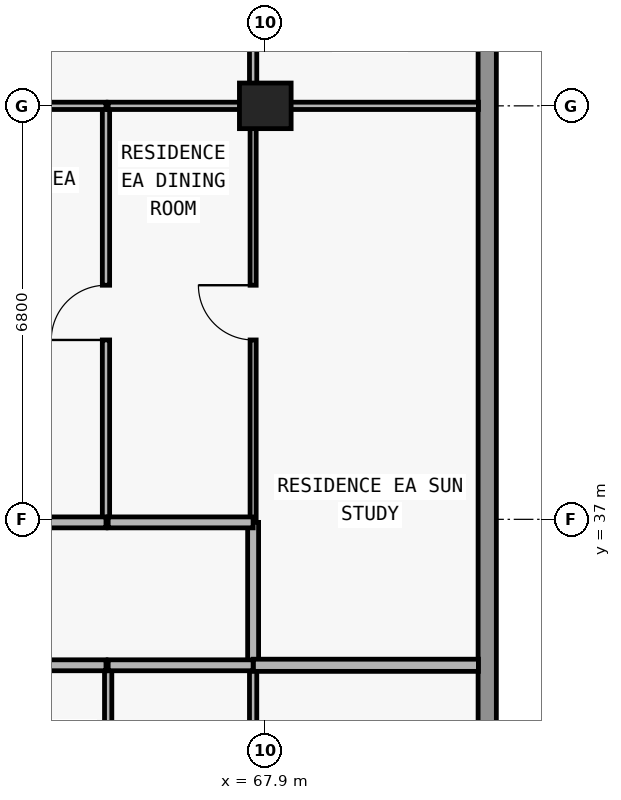
"""IFC4 building model, lengths in metres.
Left out: names, types, materials, properties, quantities, classifications, styles, units other than length and angle.
Written with IfcOpenShell. Run it as: python <this file> out.ifc"""

import sys

from ifc_helpers import new_model, si_unit, direction, frame, frame_2d, origin, origin_2d, place, context, subcontext, project, spatial, rectangle, extrude, element, fill, save


model = new_model("IFC4")
c1 = context("Model", 3, precision=1e-05, world=origin(), true_north=direction((0.0, 1.0)))
c2 = subcontext(c1, "Body", "Model", "MODEL_VIEW")
j1 = project(units=[si_unit("LENGTHUNIT", "METRE"), si_unit("PLANEANGLEUNIT", "RADIAN")], contexts=[c1])
p1 = place(None, origin())
s1 = spatial("IfcSite", under=j1, at=p1, CompositionType="ELEMENT")
p2 = place(p1, origin())
s2 = spatial("IfcBuilding", under=s1, at=p2, CompositionType="ELEMENT")
p3 = place(p2, frame((0.0, 0.0, 173.7)))
s3 = spatial("IfcBuildingStorey", under=s2, at=p3, CompositionType="ELEMENT", Elevation=173.7)
p4 = place(p3, frame((67.9, 43.8, 0.0), z_axis=(0.0, 0.0, 1.0), x_axis=(1.0, 0.0, 0.0)))
e1 = element("IfcColumn", 1, at=p4, inside=s3, PredefinedType="COLUMN", context=c2, shape_type="SweptSolid", body=[
    extrude(rectangle(XDim=0.85, YDim=0.75, at=origin_2d()), origin(), (0.0, 0.0, 1.0), 3.05),
])
p5 = place(p3, frame((71.55, 47.0, 0.0), z_axis=(0.0, 0.0, 1.0), x_axis=(0.0, -1.0, 0.0)))
e2 = element("IfcWall", 2, at=p5, inside=s3, PredefinedType="STANDARD", context=c2, shape_type="SweptSolid", body=[
    extrude(rectangle(XDim=17.9, YDim=0.3, at=frame_2d((8.95, 0.0))), origin(), (0.0, 0.0, 1.0), 3.05),
])
p6 = place(p3, frame((65.28, 37.0, 0.0), z_axis=(0.0, 0.0, 1.0), x_axis=(0.0, 1.0, 0.0)))
e3 = element("IfcWall", 3, at=p6, inside=s3, PredefinedType="PARTITIONING", context=c2, shape_type="SweptSolid", body=[
    extrude(rectangle(XDim=6.8, YDim=0.12, at=frame_2d((3.4, 0.0))), origin(), (0.0, 0.0, 1.0), 2.679),
])
p7 = place(p6, frame((2.95, 0.0, 0.0)))
e4 = element("IfcOpeningElement", 4, at=p7, cuts=e3, PredefinedType="OPENING", context=c2, shape_type="SweptSolid", body=[
    extrude(rectangle(XDim=0.9, YDim=2.15, at=frame_2d((0.45, 1.075))), frame((0.0, 0.07, 0.0), z_axis=(0.0, -1.0, 0.0), x_axis=(1.0, 0.0, 0.0)), (0.0, 0.0, 1.0), 0.14),
])
p8 = place(p3, frame((65.316, 30.34, 0.0), z_axis=(0.0, 0.0, 1.0), x_axis=(0.0, 1.0, 0.0)))
e5 = element("IfcWall", 5, at=p8, inside=s3, PredefinedType="PARTITIONING", context=c2, shape_type="SweptSolid", body=[
    extrude(rectangle(XDim=4.26, YDim=0.12, at=frame_2d((2.13, 0.0))), origin(), (0.0, 0.0, 1.0), 2.679),
])
p9 = place(p8, frame((1.705, 0.0, 0.0)))
e6 = element("IfcOpeningElement", 6, at=p9, cuts=e5, PredefinedType="OPENING", context=c2, shape_type="SweptSolid", body=[
    extrude(rectangle(XDim=0.85, YDim=2.1, at=frame_2d((0.425, 1.05))), frame((0.0, 0.07, 0.0), z_axis=(0.0, -1.0, 0.0), x_axis=(1.0, 0.0, 0.0)), (0.0, 0.0, 1.0), 0.14),
])
p10 = place(p3, frame((67.7, 30.34, 0.0), z_axis=(0.0, 0.0, 1.0), x_axis=(0.0, 1.0, 0.0)))
e7 = element("IfcWall", 7, at=p10, inside=s3, PredefinedType="PARTITIONING", context=c2, shape_type="SweptSolid", body=[
    extrude(rectangle(XDim=4.26, YDim=0.12, at=frame_2d((2.13, 0.0))), origin(), (0.0, 0.0, 1.0), 2.263),
])
p11 = place(p3, frame((67.7, 34.605, 0.0), z_axis=(0.0, 0.0, 1.0), x_axis=(0.0, 1.0, 0.0)))
e8 = element("IfcWall", 8, at=p11, inside=s3, PredefinedType="PARTITIONING", context=c2, shape_type="SweptSolid", body=[
    extrude(rectangle(XDim=2.345, YDim=0.18, at=frame_2d((1.172, 0.0))), origin(), (0.0, 0.0, 1.0), 2.263),
])
p12 = place(p3, frame((67.7, 37.0, 0.0), z_axis=(0.0, 0.0, 1.0), x_axis=(0.0, 1.0, 0.0)))
e9 = element("IfcWall", 9, at=p12, inside=s3, PredefinedType="MOVABLE", context=c2, shape_type="SweptSolid", body=[
    extrude(rectangle(XDim=6.8, YDim=0.1, at=frame_2d((3.4, 0.0))), origin(), (0.0, 0.0, 1.0), 2.263),
])
p13 = place(p12, frame((2.95, 0.0, 0.0)))
e10 = element("IfcOpeningElement", 10, at=p13, cuts=e9, PredefinedType="OPENING", context=c2, shape_type="SweptSolid", body=[
    extrude(rectangle(XDim=0.9, YDim=2.15, at=frame_2d((0.45, 1.075))), frame((0.0, 0.06, 0.0), z_axis=(0.0, -1.0, 0.0), x_axis=(1.0, 0.0, 0.0)), (0.0, 0.0, 1.0), 0.12),
])
p14 = place(p3, frame((67.7, 43.805, 0.0), z_axis=(0.0, 0.0, 1.0), x_axis=(0.0, 1.0, 0.0)))
e11 = element("IfcWall", 11, at=p14, inside=s3, PredefinedType="PARTITIONING", context=c2, shape_type="SweptSolid", body=[
    extrude(rectangle(XDim=3.075, YDim=0.12, at=frame_2d((1.538, 0.0))), origin(), (0.0, 0.0, 1.0), 3.05),
])
p15 = place(p14, frame((1.087, 0.0, 0.0)))
e12 = element("IfcOpeningElement", 12, at=p15, cuts=e11, PredefinedType="OPENING", context=c2, shape_type="SweptSolid", body=[
    extrude(rectangle(XDim=0.9, YDim=2.15, at=frame_2d((0.45, 1.075))), frame((0.0, 0.07, 0.0), z_axis=(0.0, -1.0, 0.0), x_axis=(1.0, 0.0, 0.0)), (0.0, 0.0, 1.0), 0.14),
])
p16 = place(p3, frame((59.55, 34.6, 0.0), z_axis=(0.0, 0.0, 1.0), x_axis=(1.0, 0.0, 0.0)))
e13 = element("IfcWall", 13, at=p16, inside=s3, PredefinedType="PARTITIONING", context=c2, shape_type="SweptSolid", body=[
    extrude(rectangle(XDim=5.73, YDim=0.18, at=frame_2d((2.865, 0.0))), origin(), (0.0, 0.0, 1.0), 3.05),
])
p17 = place(p16, frame((2.365, 0.0, 0.0)))
e14 = element("IfcOpeningElement", 14, at=p17, cuts=e13, PredefinedType="OPENING", context=c2, shape_type="SweptSolid", body=[
    extrude(rectangle(XDim=1.0, YDim=2.2, at=frame_2d((0.5, 1.1))), frame((0.0, 0.1, 0.0), z_axis=(0.0, -1.0, 0.0), x_axis=(1.0, 0.0, 0.0)), (0.0, 0.0, 1.0), 0.2),
])
p18 = place(p3, frame((65.316, 34.6, 0.0), z_axis=(0.0, 0.0, 1.0), x_axis=(1.0, 0.0, 0.0)))
e15 = element("IfcWall", 15, at=p18, inside=s3, PredefinedType="PARTITIONING", context=c2, shape_type="SweptSolid", body=[
    extrude(rectangle(XDim=2.384, YDim=0.18, at=frame_2d((1.192, 0.0))), origin(), (0.0, 0.0, 1.0), 3.05),
])
p19 = place(p3, frame((67.705, 34.6, 0.0), z_axis=(0.0, 0.0, 1.0), x_axis=(1.0, 0.0, 0.0)))
e16 = element("IfcWall", 16, at=p19, inside=s3, PredefinedType="PARTITIONING", context=c2, shape_type="SweptSolid", body=[
    extrude(rectangle(XDim=3.7, YDim=0.2, at=frame_2d((1.85, 0.0))), origin(), (0.0, 0.0, 1.0), 3.05),
])
p20 = place(p3, frame((59.855, 36.95, 0.0), z_axis=(0.0, 0.0, 1.0), x_axis=(1.0, 0.0, 0.0)))
e17 = element("IfcWall", 17, at=p20, inside=s3, PredefinedType="PARTITIONING", context=c2, shape_type="SweptSolid", body=[
    extrude(rectangle(XDim=5.425, YDim=0.18, at=frame_2d((2.712, 0.0))), origin(), (0.0, 0.0, 1.0), 3.05),
])
p21 = place(p20, frame((3.385, 0.0, 0.0)))
e18 = element("IfcOpeningElement", 18, at=p21, cuts=e17, PredefinedType="OPENING", context=c2, shape_type="SweptSolid", body=[
    extrude(rectangle(XDim=1.0, YDim=2.2, at=frame_2d((0.5, 1.1))), frame((0.0, 0.1, 0.0), z_axis=(0.0, -1.0, 0.0), x_axis=(1.0, 0.0, 0.0)), (0.0, 0.0, 1.0), 0.2),
])
p22 = place(p3, frame((65.316, 36.95, 0.0), z_axis=(0.0, 0.0, 1.0), x_axis=(1.0, 0.0, 0.0)))
e19 = element("IfcWall", 19, at=p22, inside=s3, PredefinedType="PARTITIONING", context=c2, shape_type="SweptSolid", body=[
    extrude(rectangle(XDim=2.384, YDim=0.18, at=frame_2d((1.192, 0.0))), origin(), (0.0, 0.0, 1.0), 3.05),
])
p23 = place(p3, frame((59.845, 43.8, 0.0), z_axis=(0.0, 0.0, 1.0), x_axis=(1.0, 0.0, 0.0)))
e20 = element("IfcWall", 20, at=p23, inside=s3, PredefinedType="PARTITIONING", context=c2, shape_type="SweptSolid", body=[
    extrude(rectangle(XDim=5.435, YDim=0.12, at=frame_2d((2.718, 0.0))), origin(), (0.0, 0.0, 1.0), 2.418),
])
p24 = place(p23, frame((3.445, 0.0, 0.0)))
e21 = element("IfcOpeningElement", 21, at=p24, cuts=e20, PredefinedType="OPENING", context=c2, shape_type="SweptSolid", body=[
    extrude(rectangle(XDim=0.9, YDim=2.15, at=frame_2d((0.45, 1.075))), frame((0.0, 0.07, 0.0), z_axis=(0.0, -1.0, 0.0), x_axis=(1.0, 0.0, 0.0)), (0.0, 0.0, 1.0), 0.14),
])
p25 = place(p23, frame((0.752, 0.0, 0.0)))
e22 = element("IfcOpeningElement", 22, at=p25, cuts=e20, PredefinedType="OPENING", context=c2, shape_type="SweptSolid", body=[
    extrude(rectangle(XDim=0.85, YDim=2.1, at=frame_2d((0.425, 1.05))), frame((0.0, 0.07, 0.0), z_axis=(0.0, -1.0, 0.0), x_axis=(1.0, 0.0, 0.0)), (0.0, 0.0, 1.0), 0.14),
])
p26 = place(p3, frame((65.316, 43.8, 0.0), z_axis=(0.0, 0.0, 1.0), x_axis=(1.0, 0.0, 0.0)))
e23 = element("IfcWall", 23, at=p26, inside=s3, PredefinedType="PARTITIONING", context=c2, shape_type="SweptSolid", body=[
    extrude(rectangle(XDim=6.089, YDim=0.12, at=frame_2d((3.044, 0.0))), origin(), (0.0, 0.0, 1.0), 2.418),
])
p27 = place(p7, origin())
e24 = element("IfcDoor", 24, at=p27, inside=s3, OperationType="SINGLE_SWING_LEFT", PredefinedType="DOOR", context=c2, shape_type="SweptSolid", body=[
    extrude(rectangle(XDim=0.9, YDim=2.15, at=frame_2d((0.45, 1.075))), frame((0.0, 0.025, 0.0), z_axis=(0.0, -1.0, 0.0), x_axis=(1.0, 0.0, 0.0)), (0.0, 0.0, 1.0), 0.05),
])
fill(e4, e24)
p28 = place(p13, origin())
e25 = element("IfcDoor", 25, at=p28, inside=s3, OperationType="SINGLE_SWING_RIGHT", PredefinedType="DOOR", context=c2, shape_type="SweptSolid", body=[
    extrude(rectangle(XDim=0.9, YDim=2.15, at=frame_2d((0.45, 1.075))), frame((0.0, 0.025, 0.0), z_axis=(0.0, -1.0, 0.0), x_axis=(1.0, 0.0, 0.0)), (0.0, 0.0, 1.0), 0.05),
])
fill(e10, e25)
save(model, sys.argv[1])
